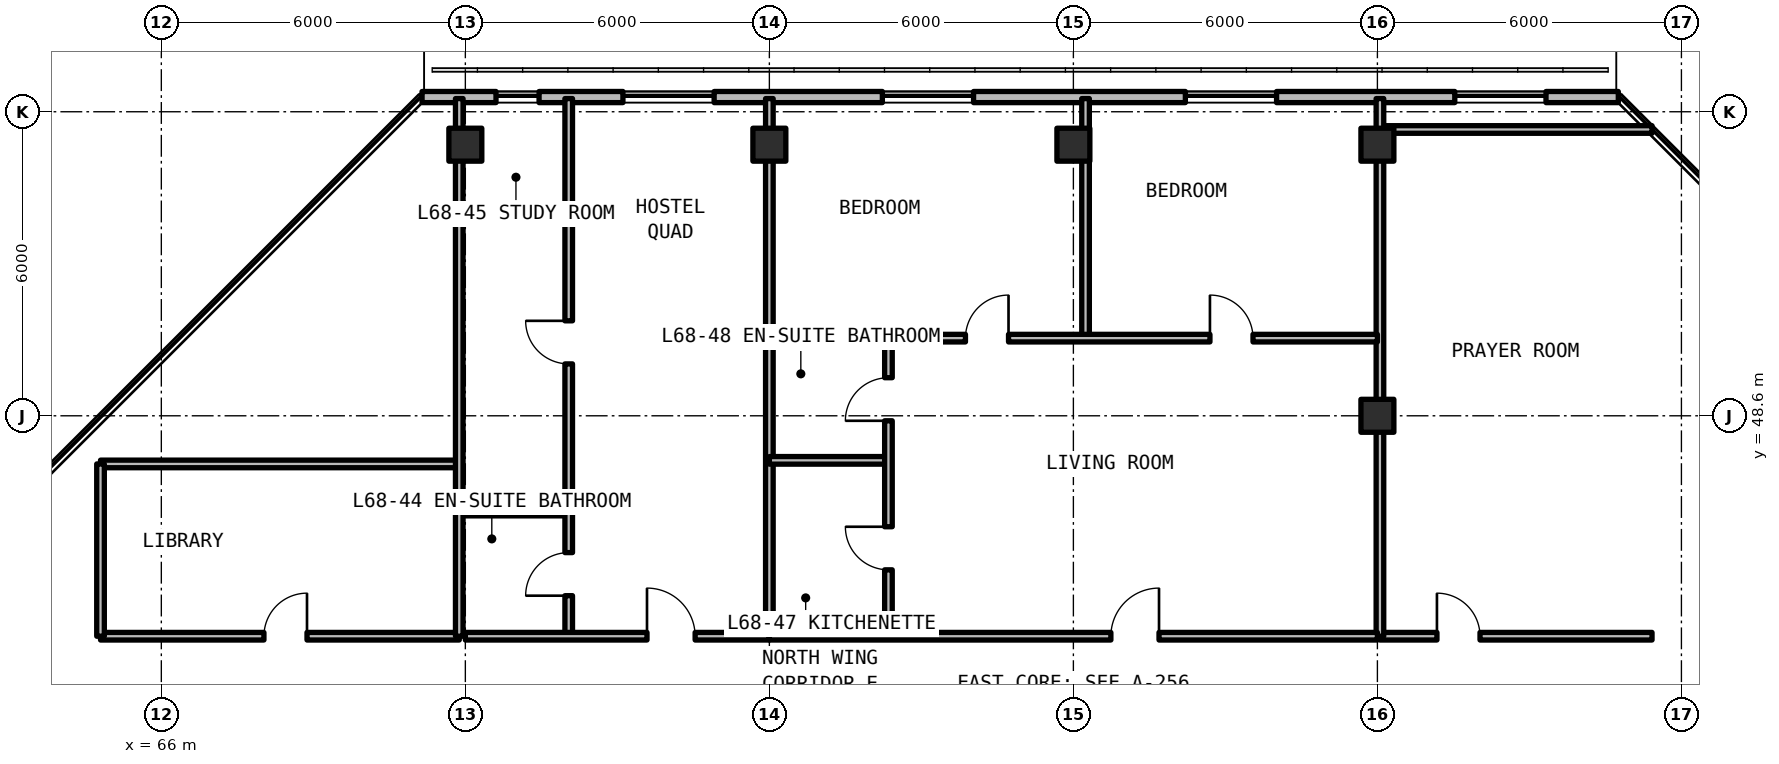
"""IFC4 building model, lengths in metres.
Left out: names, types, materials, properties, quantities, classifications, styles, units other than length and angle.
Written with IfcOpenShell. Run it as: python <this file> out.ifc"""

import sys

from ifc_helpers import new_model, si_unit, direction, frame, frame_2d, origin, origin_2d, place, context, subcontext, project, spatial, rectangle, extrude, element, fill, save


model = new_model("IFC4")
c1 = context("Model", 3, precision=1e-05, world=origin(), true_north=direction((0.0, 1.0)))
c2 = subcontext(c1, "Body", "Model", "MODEL_VIEW")
j1 = project(units=[si_unit("LENGTHUNIT", "METRE"), si_unit("PLANEANGLEUNIT", "RADIAN")], contexts=[c1])
p1 = place(None, origin())
s1 = spatial("IfcSite", under=j1, at=p1, CompositionType="ELEMENT")
p2 = place(p1, origin())
s2 = spatial("IfcBuilding", under=s1, at=p2, CompositionType="ELEMENT")
p3 = place(p2, frame((0.0, 0.0, 242.55)))
s3 = spatial("IfcBuildingStorey", under=s2, at=p3, CompositionType="ELEMENT", Elevation=242.55)
for number, where, z_axis, x_axis in (
    (1, (90.0, 48.6, 0.0), (0.0, 0.0, 1.0), (1.0, 0.0, 0.0)),
    (2, (72.0, 53.95, 0.0), (0.0, 0.0, 1.0), (1.0, 0.0, 0.0)),
    (3, (78.0, 53.95, 0.0), (0.0, 0.0, 1.0), (1.0, 0.0, 0.0)),
    (4, (84.0, 53.95, 0.0), (0.0, 0.0, 1.0), (1.0, 0.0, 0.0)),
    (5, (90.0, 53.95, 0.0), (0.0, 0.0, 1.0), (1.0, 0.0, 0.0)),
):
    element("IfcColumn", number, at=place(p3, frame(where, z_axis=z_axis, x_axis=x_axis)), inside=s3, PredefinedType="COLUMN", context=c2, shape_type="SweptSolid", body=[
        extrude(rectangle(XDim=0.65, YDim=0.65, at=origin_2d()), origin(), (0.0, 0.0, 1.0), 3.63),
    ])
p4 = place(p3, frame((94.754, 54.89, 0.0), z_axis=(0.0, 0.0, 1.0), x_axis=(-1.0, 0.0, 0.0)))
e6 = element("IfcWall", 6, at=p4, inside=s3, PredefinedType="SOLIDWALL", context=c2, shape_type="SweptSolid", body=[
    extrude(rectangle(XDim=23.609, YDim=0.22, at=frame_2d((11.804, 0.0))), origin(), (0.0, 0.0, 1.0), 3.41),
])
p5 = place(p4, frame((1.427, 0.0, 0.78)))
e7 = element("IfcOpeningElement", 7, at=p5, cuts=e6, PredefinedType="OPENING", context=c2, shape_type="SweptSolid", body=[
    extrude(rectangle(XDim=1.8, YDim=1.66, at=frame_2d((0.9, 0.83))), frame((0.0, 0.12, 0.0), z_axis=(0.0, -1.0, 0.0), x_axis=(1.0, 0.0, 0.0)), (0.0, 0.0, 1.0), 0.24),
])
p6 = place(p4, frame((21.299, 0.0, 0.78)))
e8 = element("IfcOpeningElement", 8, at=p6, cuts=e6, PredefinedType="OPENING", context=c2, shape_type="SweptSolid", body=[
    extrude(rectangle(XDim=0.85, YDim=1.65, at=frame_2d((0.425, 0.825))), frame((0.0, 0.12, 0.0), z_axis=(0.0, -1.0, 0.0), x_axis=(1.0, 0.0, 0.0)), (0.0, 0.0, 1.0), 0.24),
])
p7 = place(p4, frame((17.844, 0.0, 0.78)))
e9 = element("IfcOpeningElement", 9, at=p7, cuts=e6, PredefinedType="OPENING", context=c2, shape_type="SweptSolid", body=[
    extrude(rectangle(XDim=1.8, YDim=1.66, at=frame_2d((0.9, 0.83))), frame((0.0, 0.12, 0.0), z_axis=(0.0, -1.0, 0.0), x_axis=(1.0, 0.0, 0.0)), (0.0, 0.0, 1.0), 0.24),
])
p8 = place(p4, frame((12.724, 0.0, 0.78)))
e10 = element("IfcOpeningElement", 10, at=p8, cuts=e6, PredefinedType="OPENING", context=c2, shape_type="SweptSolid", body=[
    extrude(rectangle(XDim=1.8, YDim=1.66, at=frame_2d((0.9, 0.83))), frame((0.0, 0.12, 0.0), z_axis=(0.0, -1.0, 0.0), x_axis=(1.0, 0.0, 0.0)), (0.0, 0.0, 1.0), 0.24),
])
p9 = place(p4, frame((6.744, 0.0, 0.78)))
e11 = element("IfcOpeningElement", 11, at=p9, cuts=e6, PredefinedType="OPENING", context=c2, shape_type="SweptSolid", body=[
    extrude(rectangle(XDim=1.8, YDim=1.66, at=frame_2d((0.9, 0.83))), frame((0.0, 0.12, 0.0), z_axis=(0.0, -1.0, 0.0), x_axis=(1.0, 0.0, 0.0)), (0.0, 0.0, 1.0), 0.24),
])
p10 = place(p3, frame((64.8, 44.25, 0.0), z_axis=(0.0, 0.0, 1.0), x_axis=(1.0, 0.0, 0.0)))
e12 = element("IfcWall", 12, at=p10, inside=s3, PredefinedType="SOLIDWALL", context=c2, shape_type="SweptSolid", body=[
    extrude(rectangle(XDim=7.08, YDim=0.15, at=frame_2d((3.54, 0.0))), origin(), (0.0, 0.0, 1.0), 2.63),
])
p11 = place(p10, frame((3.225, 0.0, 0.0)))
e13 = element("IfcOpeningElement", 13, at=p11, cuts=e12, PredefinedType="OPENING", context=c2, shape_type="SweptSolid", body=[
    extrude(rectangle(XDim=0.85, YDim=2.1, at=frame_2d((0.425, 1.05))), frame((0.0, 0.085, 0.0), z_axis=(0.0, -1.0, 0.0), x_axis=(1.0, 0.0, 0.0)), (0.0, 0.0, 1.0), 0.17),
])
p12 = place(p3, frame((64.8, 47.65, 0.0), z_axis=(0.0, 0.0, 1.0), x_axis=(1.0, 0.0, 0.0)))
e14 = element("IfcWall", 14, at=p12, inside=s3, PredefinedType="SOLIDWALL", context=c2, shape_type="SweptSolid", body=[
    extrude(rectangle(XDim=7.08, YDim=0.15, at=frame_2d((3.54, 0.0))), origin(), (0.0, 0.0, 1.0), 2.63),
])
p13 = place(p3, frame((64.8, 44.25, 0.0), z_axis=(0.0, 0.0, 1.0), x_axis=(0.0, 1.0, 0.0)))
e15 = element("IfcWall", 15, at=p13, inside=s3, PredefinedType="SOLIDWALL", context=c2, shape_type="SweptSolid", body=[
    extrude(rectangle(XDim=3.4, YDim=0.15, at=frame_2d((1.7, 0.0))), origin(), (0.0, 0.0, 1.0), 2.63),
])
p14 = place(p3, frame((71.88, 44.25, 0.0), z_axis=(0.0, 0.0, 1.0), x_axis=(0.0, 1.0, 0.0)))
e16 = element("IfcWall", 16, at=p14, inside=s3, PredefinedType="SOLIDWALL", context=c2, shape_type="SweptSolid", body=[
    extrude(rectangle(XDim=10.61, YDim=0.15, at=frame_2d((5.305, 0.0))), origin(), (0.0, 0.0, 1.0), 2.63),
])
p15 = place(p3, frame((90.05, 44.25, 0.0), z_axis=(0.0, 0.0, 1.0), x_axis=(1.0, 0.0, 0.0)))
e17 = element("IfcWall", 17, at=p15, inside=s3, PredefinedType="SOLIDWALL", context=c2, shape_type="SweptSolid", body=[
    extrude(rectangle(XDim=5.37, YDim=0.15, at=frame_2d((2.685, 0.0))), origin(), (0.0, 0.0, 1.0), 2.63),
])
p16 = place(p15, frame((1.125, 0.0, 0.0)))
e18 = element("IfcOpeningElement", 18, at=p16, cuts=e17, PredefinedType="OPENING", context=c2, shape_type="SweptSolid", body=[
    extrude(rectangle(XDim=0.85, YDim=2.1, at=frame_2d((0.425, 1.05))), frame((0.0, 0.085, 0.0), z_axis=(0.0, -1.0, 0.0), x_axis=(1.0, 0.0, 0.0)), (0.0, 0.0, 1.0), 0.17),
])
p17 = place(p3, frame((90.05, 54.25, 0.0), z_axis=(0.0, 0.0, 1.0), x_axis=(1.0, 0.0, 0.0)))
e19 = element("IfcWall", 19, at=p17, inside=s3, PredefinedType="SOLIDWALL", context=c2, shape_type="SweptSolid", body=[
    extrude(rectangle(XDim=5.37, YDim=0.15, at=frame_2d((2.685, 0.0))), origin(), (0.0, 0.0, 1.0), 2.63),
])
for number, where, z_axis, x_axis in (
    (20, (90.05, 44.25, 0.0), (0.0, 0.0, 1.0), (0.0, 1.0, 0.0)),
    (21, (78.0, 44.25, 0.0), (0.0, 0.0, 1.0), (0.0, 1.0, 0.0)),
):
    element("IfcWall", number, at=place(p3, frame(where, z_axis=z_axis, x_axis=x_axis)), inside=s3, PredefinedType="SOLIDWALL", context=c2, shape_type="SweptSolid", body=[
        extrude(rectangle(XDim=10.61, YDim=0.15, at=frame_2d((5.305, 0.0))), origin(), (0.0, 0.0, 1.0), 2.63),
    ])
p18 = place(p3, frame((72.0, 46.7, 0.0), z_axis=(0.0, 0.0, 1.0), x_axis=(1.0, 0.0, 0.0)))
e22 = element("IfcWall", 22, at=p18, inside=s3, PredefinedType="PARTITIONING", context=c2, shape_type="SweptSolid", body=[
    extrude(rectangle(XDim=2.04, YDim=0.15, at=frame_2d((1.02, 0.0))), origin(), (0.0, 0.0, 1.0), 2.63),
])
p19 = place(p3, frame((74.04, 44.25, 0.0), z_axis=(0.0, 0.0, 1.0), x_axis=(0.0, 1.0, 0.0)))
e23 = element("IfcWall", 23, at=p19, inside=s3, PredefinedType="PARTITIONING", context=c2, shape_type="SweptSolid", body=[
    extrude(rectangle(XDim=10.61, YDim=0.15, at=frame_2d((5.305, 0.0))), origin(), (0.0, 0.0, 1.0), 2.63),
])
p20 = place(p19, frame((0.8, 0.0, 0.0)))
e24 = element("IfcOpeningElement", 24, at=p20, cuts=e23, PredefinedType="OPENING", context=c2, shape_type="SweptSolid", body=[
    extrude(rectangle(XDim=0.85, YDim=2.1, at=frame_2d((0.425, 1.05))), frame((0.0, 0.085, 0.0), z_axis=(0.0, -1.0, 0.0), x_axis=(1.0, 0.0, 0.0)), (0.0, 0.0, 1.0), 0.17),
])
p21 = place(p19, frame((5.374, 0.0, 0.0)))
e25 = element("IfcOpeningElement", 25, at=p21, cuts=e23, PredefinedType="OPENING", context=c2, shape_type="SweptSolid", body=[
    extrude(rectangle(XDim=0.85, YDim=2.1, at=frame_2d((0.425, 1.05))), frame((0.0, 0.085, 0.0), z_axis=(0.0, -1.0, 0.0), x_axis=(1.0, 0.0, 0.0)), (0.0, 0.0, 1.0), 0.17),
])
p22 = place(p3, frame((72.0, 44.25, 0.0), z_axis=(0.0, 0.0, 1.0), x_axis=(1.0, 0.0, 0.0)))
e26 = element("IfcWall", 26, at=p22, inside=s3, PredefinedType="SOLIDWALL", context=c2, shape_type="SweptSolid", body=[
    extrude(rectangle(XDim=6.0, YDim=0.15, at=frame_2d((3.0, 0.0))), origin(), (0.0, 0.0, 1.0), 2.63),
])
p23 = place(p22, frame((3.585, 0.0, 0.0)))
e27 = element("IfcOpeningElement", 27, at=p23, cuts=e26, PredefinedType="OPENING", context=c2, shape_type="SweptSolid", body=[
    extrude(rectangle(XDim=0.95, YDim=2.15, at=frame_2d((0.475, 1.075))), frame((0.0, 0.085, 0.0), z_axis=(0.0, -1.0, 0.0), x_axis=(1.0, 0.0, 0.0)), (0.0, 0.0, 1.0), 0.17),
])
p24 = place(p3, frame((78.0, 47.721, 0.0), z_axis=(0.0, 0.0, 1.0), x_axis=(1.0, 0.0, 0.0)))
e28 = element("IfcWall", 28, at=p24, inside=s3, PredefinedType="PARTITIONING", context=c2, shape_type="SweptSolid", body=[
    extrude(rectangle(XDim=2.35, YDim=0.15, at=frame_2d((1.175, 0.0))), origin(), (0.0, 0.0, 1.0), 2.63),
])
p25 = place(p3, frame((80.35, 44.25, 0.0), z_axis=(0.0, 0.0, 1.0), x_axis=(0.0, 1.0, 0.0)))
e29 = element("IfcWall", 29, at=p25, inside=s3, PredefinedType="PARTITIONING", context=c2, shape_type="SweptSolid", body=[
    extrude(rectangle(XDim=5.882, YDim=0.15, at=frame_2d((2.941, 0.0))), origin(), (0.0, 0.0, 1.0), 2.63),
])
p26 = place(p25, frame((1.31, 0.0, 0.0)))
e30 = element("IfcOpeningElement", 30, at=p26, cuts=e29, PredefinedType="OPENING", context=c2, shape_type="SweptSolid", body=[
    extrude(rectangle(XDim=0.85, YDim=2.1, at=frame_2d((0.425, 1.05))), frame((0.0, 0.085, 0.0), z_axis=(0.0, -1.0, 0.0), x_axis=(1.0, 0.0, 0.0)), (0.0, 0.0, 1.0), 0.17),
])
p27 = place(p25, frame((4.251, 0.0, 0.0)))
e31 = element("IfcOpeningElement", 31, at=p27, cuts=e29, PredefinedType="OPENING", context=c2, shape_type="SweptSolid", body=[
    extrude(rectangle(XDim=0.85, YDim=2.1, at=frame_2d((0.425, 1.05))), frame((0.0, 0.085, 0.0), z_axis=(0.0, -1.0, 0.0), x_axis=(1.0, 0.0, 0.0)), (0.0, 0.0, 1.0), 0.17),
])
p28 = place(p3, frame((84.24, 50.132, 0.0), z_axis=(0.0, 0.0, 1.0), x_axis=(0.0, 1.0, 0.0)))
e32 = element("IfcWall", 32, at=p28, inside=s3, PredefinedType="PARTITIONING", context=c2, shape_type="SweptSolid", body=[
    extrude(rectangle(XDim=4.728, YDim=0.15, at=frame_2d((2.364, 0.0))), origin(), (0.0, 0.0, 1.0), 2.63),
])
p29 = place(p3, frame((78.0, 50.132, 0.0), z_axis=(0.0, 0.0, 1.0), x_axis=(1.0, 0.0, 0.0)))
e33 = element("IfcWall", 33, at=p29, inside=s3, PredefinedType="PARTITIONING", context=c2, shape_type="SweptSolid", body=[
    extrude(rectangle(XDim=12.0, YDim=0.15, at=frame_2d((6.0, 0.0))), origin(), (0.0, 0.0, 1.0), 2.63),
])
p30 = place(p29, frame((3.87, 0.0, 0.0)))
e34 = element("IfcOpeningElement", 34, at=p30, cuts=e33, PredefinedType="OPENING", context=c2, shape_type="SweptSolid", body=[
    extrude(rectangle(XDim=0.85, YDim=2.1, at=frame_2d((0.425, 1.05))), frame((0.0, 0.085, 0.0), z_axis=(0.0, -1.0, 0.0), x_axis=(1.0, 0.0, 0.0)), (0.0, 0.0, 1.0), 0.17),
])
p31 = place(p29, frame((8.695, 0.0, 0.0)))
e35 = element("IfcOpeningElement", 35, at=p31, cuts=e33, PredefinedType="OPENING", context=c2, shape_type="SweptSolid", body=[
    extrude(rectangle(XDim=0.85, YDim=2.1, at=frame_2d((0.425, 1.05))), frame((0.0, 0.085, 0.0), z_axis=(0.0, -1.0, 0.0), x_axis=(1.0, 0.0, 0.0)), (0.0, 0.0, 1.0), 0.17),
])
p32 = place(p3, frame((78.0, 44.25, 0.0), z_axis=(0.0, 0.0, 1.0), x_axis=(1.0, 0.0, 0.0)))
e36 = element("IfcWall", 36, at=p32, inside=s3, PredefinedType="SOLIDWALL", context=c2, shape_type="SweptSolid", body=[
    extrude(rectangle(XDim=12.0, YDim=0.15, at=frame_2d((6.0, 0.0))), origin(), (0.0, 0.0, 1.0), 2.63),
])
p33 = place(p32, frame((6.74, 0.0, 0.0)))
e37 = element("IfcOpeningElement", 37, at=p33, cuts=e36, PredefinedType="OPENING", context=c2, shape_type="SweptSolid", body=[
    extrude(rectangle(XDim=0.95, YDim=2.15, at=frame_2d((0.475, 1.075))), frame((0.0, 0.085, 0.0), z_axis=(0.0, -1.0, 0.0), x_axis=(1.0, 0.0, 0.0)), (0.0, 0.0, 1.0), 0.17),
])
p34 = place(p5, origin())
e38 = element("IfcWindow", 38, at=p34, inside=s3, PartitioningType="SINGLE_PANEL", PredefinedType="WINDOW", context=c2, shape_type="SweptSolid", body=[
    extrude(rectangle(XDim=1.8, YDim=1.66, at=frame_2d((0.9, 0.83))), frame((0.0, 0.03, 0.0), z_axis=(0.0, -1.0, 0.0), x_axis=(1.0, 0.0, 0.0)), (0.0, 0.0, 1.0), 0.06),
])
fill(e7, e38)
p35 = place(p6, origin())
e39 = element("IfcWindow", 39, at=p35, inside=s3, PartitioningType="SINGLE_PANEL", PredefinedType="WINDOW", context=c2, shape_type="SweptSolid", body=[
    extrude(rectangle(XDim=0.85, YDim=1.65, at=frame_2d((0.425, 0.825))), frame((0.0, 0.03, 0.0), z_axis=(0.0, -1.0, 0.0), x_axis=(1.0, 0.0, 0.0)), (0.0, 0.0, 1.0), 0.06),
])
fill(e8, e39)
p36 = place(p7, origin())
e40 = element("IfcWindow", 40, at=p36, inside=s3, PartitioningType="SINGLE_PANEL", PredefinedType="WINDOW", context=c2, shape_type="SweptSolid", body=[
    extrude(rectangle(XDim=1.8, YDim=1.66, at=frame_2d((0.9, 0.83))), frame((0.0, 0.03, 0.0), z_axis=(0.0, -1.0, 0.0), x_axis=(1.0, 0.0, 0.0)), (0.0, 0.0, 1.0), 0.06),
])
fill(e9, e40)
p37 = place(p8, origin())
e41 = element("IfcWindow", 41, at=p37, inside=s3, PartitioningType="SINGLE_PANEL", PredefinedType="WINDOW", context=c2, shape_type="SweptSolid", body=[
    extrude(rectangle(XDim=1.8, YDim=1.66, at=frame_2d((0.9, 0.83))), frame((0.0, 0.03, 0.0), z_axis=(0.0, -1.0, 0.0), x_axis=(1.0, 0.0, 0.0)), (0.0, 0.0, 1.0), 0.06),
])
fill(e10, e41)
p38 = place(p9, origin())
e42 = element("IfcWindow", 42, at=p38, inside=s3, PartitioningType="SINGLE_PANEL", PredefinedType="WINDOW", context=c2, shape_type="SweptSolid", body=[
    extrude(rectangle(XDim=1.8, YDim=1.66, at=frame_2d((0.9, 0.83))), frame((0.0, 0.03, 0.0), z_axis=(0.0, -1.0, 0.0), x_axis=(1.0, 0.0, 0.0)), (0.0, 0.0, 1.0), 0.06),
])
fill(e11, e42)
p39 = place(p11, origin())
e43 = element("IfcDoor", 43, at=p39, inside=s3, OperationType="SINGLE_SWING_RIGHT", PredefinedType="DOOR", context=c2, shape_type="SweptSolid", body=[
    extrude(rectangle(XDim=0.85, YDim=2.1, at=frame_2d((0.425, 1.05))), frame((0.0, 0.025, 0.0), z_axis=(0.0, -1.0, 0.0), x_axis=(1.0, 0.0, 0.0)), (0.0, 0.0, 1.0), 0.05),
])
fill(e13, e43)
p40 = place(p16, origin())
e44 = element("IfcDoor", 44, at=p40, inside=s3, OperationType="SINGLE_SWING_LEFT", PredefinedType="DOOR", context=c2, shape_type="SweptSolid", body=[
    extrude(rectangle(XDim=0.85, YDim=2.1, at=frame_2d((0.425, 1.05))), frame((0.0, 0.025, 0.0), z_axis=(0.0, -1.0, 0.0), x_axis=(1.0, 0.0, 0.0)), (0.0, 0.0, 1.0), 0.05),
])
fill(e18, e44)
p41 = place(p20, origin())
e45 = element("IfcDoor", 45, at=p41, inside=s3, OperationType="SINGLE_SWING_LEFT", PredefinedType="DOOR", context=c2, shape_type="SweptSolid", body=[
    extrude(rectangle(XDim=0.85, YDim=2.1, at=frame_2d((0.425, 1.05))), frame((0.0, 0.025, 0.0), z_axis=(0.0, -1.0, 0.0), x_axis=(1.0, 0.0, 0.0)), (0.0, 0.0, 1.0), 0.05),
])
fill(e24, e45)
p42 = place(p21, origin())
e46 = element("IfcDoor", 46, at=p42, inside=s3, OperationType="SINGLE_SWING_RIGHT", PredefinedType="DOOR", context=c2, shape_type="SweptSolid", body=[
    extrude(rectangle(XDim=0.85, YDim=2.1, at=frame_2d((0.425, 1.05))), frame((0.0, 0.025, 0.0), z_axis=(0.0, -1.0, 0.0), x_axis=(1.0, 0.0, 0.0)), (0.0, 0.0, 1.0), 0.05),
])
fill(e25, e46)
p43 = place(p23, origin())
e47 = element("IfcDoor", 47, at=p43, inside=s3, OperationType="SINGLE_SWING_LEFT", PredefinedType="DOOR", context=c2, shape_type="SweptSolid", body=[
    extrude(rectangle(XDim=0.95, YDim=2.15, at=frame_2d((0.475, 1.075))), frame((0.0, 0.025, 0.0), z_axis=(0.0, -1.0, 0.0), x_axis=(1.0, 0.0, 0.0)), (0.0, 0.0, 1.0), 0.05),
])
fill(e27, e47)
p44 = place(p26, origin())
e48 = element("IfcDoor", 48, at=p44, inside=s3, OperationType="SINGLE_SWING_RIGHT", PredefinedType="DOOR", context=c2, shape_type="SweptSolid", body=[
    extrude(rectangle(XDim=0.85, YDim=2.1, at=frame_2d((0.425, 1.05))), frame((0.0, 0.025, 0.0), z_axis=(0.0, -1.0, 0.0), x_axis=(1.0, 0.0, 0.0)), (0.0, 0.0, 1.0), 0.05),
])
fill(e30, e48)
p45 = place(p27, origin())
e49 = element("IfcDoor", 49, at=p45, inside=s3, OperationType="SINGLE_SWING_LEFT", PredefinedType="DOOR", context=c2, shape_type="SweptSolid", body=[
    extrude(rectangle(XDim=0.85, YDim=2.1, at=frame_2d((0.425, 1.05))), frame((0.0, 0.025, 0.0), z_axis=(0.0, -1.0, 0.0), x_axis=(1.0, 0.0, 0.0)), (0.0, 0.0, 1.0), 0.05),
])
fill(e31, e49)
p46 = place(p30, origin())
e50 = element("IfcDoor", 50, at=p46, inside=s3, OperationType="SINGLE_SWING_RIGHT", PredefinedType="DOOR", context=c2, shape_type="SweptSolid", body=[
    extrude(rectangle(XDim=0.85, YDim=2.1, at=frame_2d((0.425, 1.05))), frame((0.0, 0.025, 0.0), z_axis=(0.0, -1.0, 0.0), x_axis=(1.0, 0.0, 0.0)), (0.0, 0.0, 1.0), 0.05),
])
fill(e34, e50)
p47 = place(p31, origin())
e51 = element("IfcDoor", 51, at=p47, inside=s3, OperationType="SINGLE_SWING_LEFT", PredefinedType="DOOR", context=c2, shape_type="SweptSolid", body=[
    extrude(rectangle(XDim=0.85, YDim=2.1, at=frame_2d((0.425, 1.05))), frame((0.0, 0.025, 0.0), z_axis=(0.0, -1.0, 0.0), x_axis=(1.0, 0.0, 0.0)), (0.0, 0.0, 1.0), 0.05),
])
fill(e35, e51)
p48 = place(p33, origin())
e52 = element("IfcDoor", 52, at=p48, inside=s3, OperationType="SINGLE_SWING_RIGHT", PredefinedType="DOOR", context=c2, shape_type="SweptSolid", body=[
    extrude(rectangle(XDim=0.95, YDim=2.15, at=frame_2d((0.475, 1.075))), frame((0.0, 0.025, 0.0), z_axis=(0.0, -1.0, 0.0), x_axis=(1.0, 0.0, 0.0)), (0.0, 0.0, 1.0), 0.05),
])
fill(e37, e52)
save(model, sys.argv[1])
